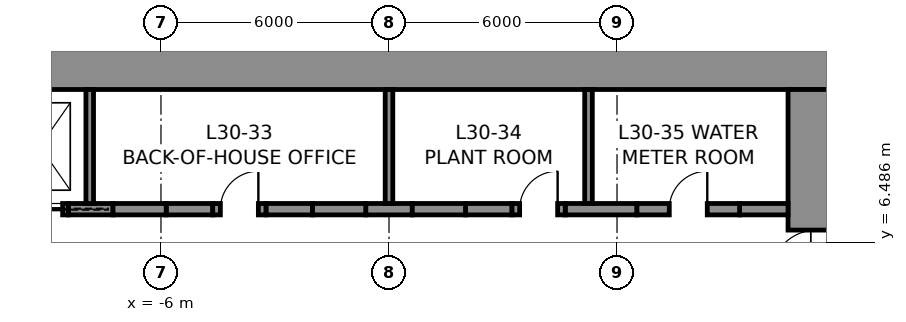
"""IFC4 building model, lengths in metres.
Left out: names, types, materials, properties, quantities, classifications, styles, units other than length and angle.
Written with IfcOpenShell. Run it as: python <this file> out.ifc"""

import sys

from ifc_helpers import new_model, si_unit, direction, frame, frame_2d, origin, place, context, subcontext, project, spatial, rectangle, extrude, element, fill, save


model = new_model("IFC4")
c1 = context("Model", 3, precision=1e-05, world=origin(), true_north=direction((0.0, 1.0)))
c2 = subcontext(c1, "Body", "Model", "MODEL_VIEW")
j1 = project(units=[si_unit("LENGTHUNIT", "METRE"), si_unit("PLANEANGLEUNIT", "RADIAN")], contexts=[c1])
p1 = place(None, origin())
s1 = spatial("IfcSite", under=j1, at=p1, CompositionType="ELEMENT")
p2 = place(p1, origin())
s2 = spatial("IfcBuilding", under=s1, at=p2, CompositionType="ELEMENT")
p3 = place(p2, frame((0.0, 0.0, 147.8)))
s3 = spatial("IfcBuildingStorey", under=s2, at=p3, CompositionType="ELEMENT", Elevation=147.8)
p4 = place(p3, frame((-12.0, 11.25, 0.0), z_axis=(0.0, 0.0, 1.0), x_axis=(1.0, 0.0, 0.0)))
e1 = element("IfcWall", 1, at=p4, inside=s3, PredefinedType="SHEAR", context=c2, shape_type="SweptSolid", body=[
    extrude(rectangle(XDim=24.0, YDim=1.5, at=frame_2d((12.0, 0.0))), origin(), (0.0, 0.0, 1.0), 4.0),
])
p5 = place(p3, frame((11.25, 10.5, 0.0), z_axis=(0.0, 0.0, 1.0), x_axis=(0.0, -1.0, 0.0)))
e2 = element("IfcWall", 2, at=p5, inside=s3, PredefinedType="SHEAR", context=c2, shape_type="SweptSolid", body=[
    extrude(rectangle(XDim=21.0, YDim=1.5, at=frame_2d((10.5, 0.0))), origin(), (0.0, 0.0, 1.0), 4.0),
])
p6 = place(p5, frame((3.7, 0.0, 0.0)))
e3 = element("IfcOpeningElement", 3, at=p6, cuts=e2, PredefinedType="OPENING", context=c2, shape_type="SweptSolid", body=[
    extrude(rectangle(XDim=1.2, YDim=2.3, at=frame_2d((0.6, 1.15))), frame((0.0, 0.76, 0.0), z_axis=(0.0, -1.0, 0.0), x_axis=(1.0, 0.0, 0.0)), (0.0, 0.0, 1.0), 1.52),
])
p7 = place(p5, frame((16.1, 0.0, 0.0)))
e4 = element("IfcOpeningElement", 4, at=p7, cuts=e2, PredefinedType="OPENING", context=c2, shape_type="SweptSolid", body=[
    extrude(rectangle(XDim=1.2, YDim=2.3, at=frame_2d((0.6, 1.15))), frame((0.0, 0.76, 0.0), z_axis=(0.0, -1.0, 0.0), x_axis=(1.0, 0.0, 0.0)), (0.0, 0.0, 1.0), 1.52),
])
p8 = place(p3, frame((-8.438, 7.35, 0.0), z_axis=(0.0, 0.0, 1.0), x_axis=(1.0, 0.0, 0.0)))
e5 = element("IfcWall", 5, at=p8, inside=s3, PredefinedType="SHEAR", context=c2, shape_type="SweptSolid", body=[
    extrude(rectangle(XDim=1.175, YDim=0.3, at=frame_2d((0.587, 0.0))), origin(), (0.0, 0.0, 1.0), 4.0),
])
for number, where, z_axis, x_axis in (
    (6, (-5.863, 7.35, 0.0), (0.0, 0.0, 1.0), (1.0, 0.0, 0.0)),
    (7, (-3.238, 7.35, 0.0), (0.0, 0.0, 1.0), (1.0, 0.0, 0.0)),
    (8, (-0.613, 7.35, 0.0), (0.0, 0.0, 1.0), (1.0, 0.0, 0.0)),
    (9, (2.012, 7.35, 0.0), (0.0, 0.0, 1.0), (1.0, 0.0, 0.0)),
):
    element("IfcWall", number, at=place(p3, frame(where, z_axis=z_axis, x_axis=x_axis)), inside=s3, PredefinedType="SHEAR", context=c2, shape_type="SweptSolid", body=[
        extrude(rectangle(XDim=1.225, YDim=0.3, at=frame_2d((0.613, 0.0))), origin(), (0.0, 0.0, 1.0), 4.0),
    ])
p9 = place(p3, frame((4.637, 7.35, 0.0), z_axis=(0.0, 0.0, 1.0), x_axis=(1.0, 0.0, 0.0)))
e10 = element("IfcWall", 10, at=p9, inside=s3, PredefinedType="SHEAR", context=c2, shape_type="SweptSolid", body=[
    extrude(rectangle(XDim=1.887, YDim=0.3, at=frame_2d((0.944, 0.0))), origin(), (0.0, 0.0, 1.0), 4.0),
])
p10 = place(p3, frame((9.225, 7.35, 0.0), z_axis=(0.0, 0.0, 1.0), x_axis=(1.0, 0.0, 0.0)))
e11 = element("IfcWall", 11, at=p10, inside=s3, PredefinedType="SHEAR", context=c2, shape_type="SweptSolid", body=[
    extrude(rectangle(XDim=1.275, YDim=0.3, at=frame_2d((0.637, 0.0))), origin(), (0.0, 0.0, 1.0), 4.0),
])
p11 = place(p3, frame((-9.938, 7.35, 0.0), z_axis=(0.0, 0.0, 1.0), x_axis=(1.0, 0.0, 0.0)))
e12 = element("IfcWall", 12, at=p11, inside=s3, PredefinedType="PARTITIONING", context=c2, shape_type="SweptSolid", body=[
    extrude(rectangle(XDim=1.5, YDim=0.3, at=frame_2d((0.75, 0.0))), origin(), (0.0, 0.0, 1.0), 4.0),
])
p12 = place(p11, frame((0.15, 0.0, 0.0)))
e13 = element("IfcOpeningElement", 13, at=p12, cuts=e12, PredefinedType="OPENING", context=c2, shape_type="SweptSolid", body=[
    extrude(rectangle(XDim=1.2, YDim=2.3, at=frame_2d((0.6, 1.15))), frame((0.0, 0.16, 0.0), z_axis=(0.0, -1.0, 0.0), x_axis=(1.0, 0.0, 0.0)), (0.0, 0.0, 1.0), 0.32),
])
p13 = place(p3, frame((-7.262, 7.35, 0.0), z_axis=(0.0, 0.0, 1.0), x_axis=(1.0, 0.0, 0.0)))
e14 = element("IfcWall", 14, at=p13, inside=s3, PredefinedType="PARTITIONING", context=c2, shape_type="SweptSolid", body=[
    extrude(rectangle(XDim=1.4, YDim=0.3, at=frame_2d((0.7, 0.0))), origin(), (0.0, 0.0, 1.0), 4.0),
])
p14 = place(p3, frame((-4.637, 7.35, 0.0), z_axis=(0.0, 0.0, 1.0), x_axis=(1.0, 0.0, 0.0)))
e15 = element("IfcWall", 15, at=p14, inside=s3, PredefinedType="PARTITIONING", context=c2, shape_type="SweptSolid", body=[
    extrude(rectangle(XDim=1.4, YDim=0.3, at=frame_2d((0.7, 0.0))), origin(), (0.0, 0.0, 1.0), 4.0),
])
p15 = place(p14, frame((0.2, 0.0, 0.0)))
e16 = element("IfcOpeningElement", 16, at=p15, cuts=e15, PredefinedType="OPENING", context=c2, shape_type="SweptSolid", body=[
    extrude(rectangle(XDim=1.0, YDim=2.3, at=frame_2d((0.5, 1.15))), frame((0.0, 0.16, 0.0), z_axis=(0.0, -1.0, 0.0), x_axis=(1.0, 0.0, 0.0)), (0.0, 0.0, 1.0), 0.32),
])
for number, where, z_axis, x_axis in (
    (17, (-2.012, 7.35, 0.0), (0.0, 0.0, 1.0), (1.0, 0.0, 0.0)),
    (18, (0.613, 7.35, 0.0), (0.0, 0.0, 1.0), (1.0, 0.0, 0.0)),
):
    element("IfcWall", number, at=place(p3, frame(where, z_axis=z_axis, x_axis=x_axis)), inside=s3, PredefinedType="PARTITIONING", context=c2, shape_type="SweptSolid", body=[
        extrude(rectangle(XDim=1.4, YDim=0.3, at=frame_2d((0.7, 0.0))), origin(), (0.0, 0.0, 1.0), 4.0),
    ])
p16 = place(p3, frame((3.238, 7.35, 0.0), z_axis=(0.0, 0.0, 1.0), x_axis=(1.0, 0.0, 0.0)))
e19 = element("IfcWall", 19, at=p16, inside=s3, PredefinedType="PARTITIONING", context=c2, shape_type="SweptSolid", body=[
    extrude(rectangle(XDim=1.4, YDim=0.3, at=frame_2d((0.7, 0.0))), origin(), (0.0, 0.0, 1.0), 4.0),
])
p17 = place(p16, frame((0.2, 0.0, 0.0)))
e20 = element("IfcOpeningElement", 20, at=p17, cuts=e19, PredefinedType="OPENING", context=c2, shape_type="SweptSolid", body=[
    extrude(rectangle(XDim=1.0, YDim=2.3, at=frame_2d((0.5, 1.15))), frame((0.0, 0.16, 0.0), z_axis=(0.0, -1.0, 0.0), x_axis=(1.0, 0.0, 0.0)), (0.0, 0.0, 1.0), 0.32),
])
p18 = place(p3, frame((6.525, 7.35, 0.0), z_axis=(0.0, 0.0, 1.0), x_axis=(1.0, 0.0, 0.0)))
e21 = element("IfcWall", 21, at=p18, inside=s3, PredefinedType="PARTITIONING", context=c2, shape_type="SweptSolid", body=[
    extrude(rectangle(XDim=2.7, YDim=0.3, at=frame_2d((1.35, 0.0))), origin(), (0.0, 0.0, 1.0), 4.0),
])
p19 = place(p18, frame((0.85, 0.0, 0.0)))
e22 = element("IfcOpeningElement", 22, at=p19, cuts=e21, PredefinedType="OPENING", context=c2, shape_type="SweptSolid", body=[
    extrude(rectangle(XDim=1.0, YDim=2.3, at=frame_2d((0.5, 1.15))), frame((0.0, 0.16, 0.0), z_axis=(0.0, -1.0, 0.0), x_axis=(1.0, 0.0, 0.0)), (0.0, 0.0, 1.0), 0.32),
])
for number, where, z_axis, x_axis in (
    (23, (-7.875, 7.5, 0.0), (0.0, 0.0, 1.0), (0.0, 1.0, 0.0)),
    (24, (0.0, 7.5, 0.0), (0.0, 0.0, 1.0), (0.0, 1.0, 0.0)),
    (25, (5.25, 7.5, 0.0), (0.0, 0.0, 1.0), (0.0, 1.0, 0.0)),
):
    element("IfcWall", number, at=place(p3, frame(where, z_axis=z_axis, x_axis=x_axis)), inside=s3, PredefinedType="PARTITIONING", context=c2, shape_type="SweptSolid", body=[
        extrude(rectangle(XDim=3.0, YDim=0.2, at=frame_2d((1.5, 0.0))), origin(), (0.0, 0.0, 1.0), 4.0),
    ])
p20 = place(p15, origin())
e26 = element("IfcDoor", 26, at=p20, inside=s3, OperationType="SINGLE_SWING_RIGHT", PredefinedType="DOOR", context=c2, shape_type="SweptSolid", body=[
    extrude(rectangle(XDim=1.0, YDim=2.3, at=frame_2d((0.5, 1.15))), frame((0.0, 0.025, 0.0), z_axis=(0.0, -1.0, 0.0), x_axis=(1.0, 0.0, 0.0)), (0.0, 0.0, 1.0), 0.05),
])
fill(e16, e26)
p21 = place(p17, origin())
e27 = element("IfcDoor", 27, at=p21, inside=s3, OperationType="SINGLE_SWING_RIGHT", PredefinedType="DOOR", context=c2, shape_type="SweptSolid", body=[
    extrude(rectangle(XDim=1.0, YDim=2.3, at=frame_2d((0.5, 1.15))), frame((0.0, 0.025, 0.0), z_axis=(0.0, -1.0, 0.0), x_axis=(1.0, 0.0, 0.0)), (0.0, 0.0, 1.0), 0.05),
])
fill(e20, e27)
p22 = place(p19, origin())
e28 = element("IfcDoor", 28, at=p22, inside=s3, OperationType="SINGLE_SWING_RIGHT", PredefinedType="DOOR", context=c2, shape_type="SweptSolid", body=[
    extrude(rectangle(XDim=1.0, YDim=2.3, at=frame_2d((0.5, 1.15))), frame((0.0, 0.025, 0.0), z_axis=(0.0, -1.0, 0.0), x_axis=(1.0, 0.0, 0.0)), (0.0, 0.0, 1.0), 0.05),
])
fill(e22, e28)
p23 = place(p6, frame((1.2, 0.0, 0.0), z_axis=(0.0, 0.0, 1.0), x_axis=(-1.0, 0.0, 0.0)))
e29 = element("IfcDoor", 29, at=p23, inside=s3, OperationType="SINGLE_SWING_LEFT", PredefinedType="DOOR", context=c2, shape_type="SweptSolid", body=[
    extrude(rectangle(XDim=1.2, YDim=2.3, at=frame_2d((0.6, 1.15))), frame((0.0, 0.025, 0.0), z_axis=(0.0, -1.0, 0.0), x_axis=(1.0, 0.0, 0.0)), (0.0, 0.0, 1.0), 0.05),
])
fill(e3, e29)
p24 = place(p12, frame((1.2, 0.0, 0.0), z_axis=(0.0, 0.0, 1.0), x_axis=(-1.0, 0.0, 0.0)))
e30 = element("IfcDoor", 30, at=p24, inside=s3, OperationType="SLIDING_TO_LEFT", PredefinedType="DOOR", context=c2, shape_type="SweptSolid", body=[
    extrude(rectangle(XDim=1.2, YDim=2.3, at=frame_2d((0.6, 1.15))), frame((0.0, 0.025, 0.0), z_axis=(0.0, -1.0, 0.0), x_axis=(1.0, 0.0, 0.0)), (0.0, 0.0, 1.0), 0.05),
])
fill(e13, e30)
save(model, sys.argv[1])
